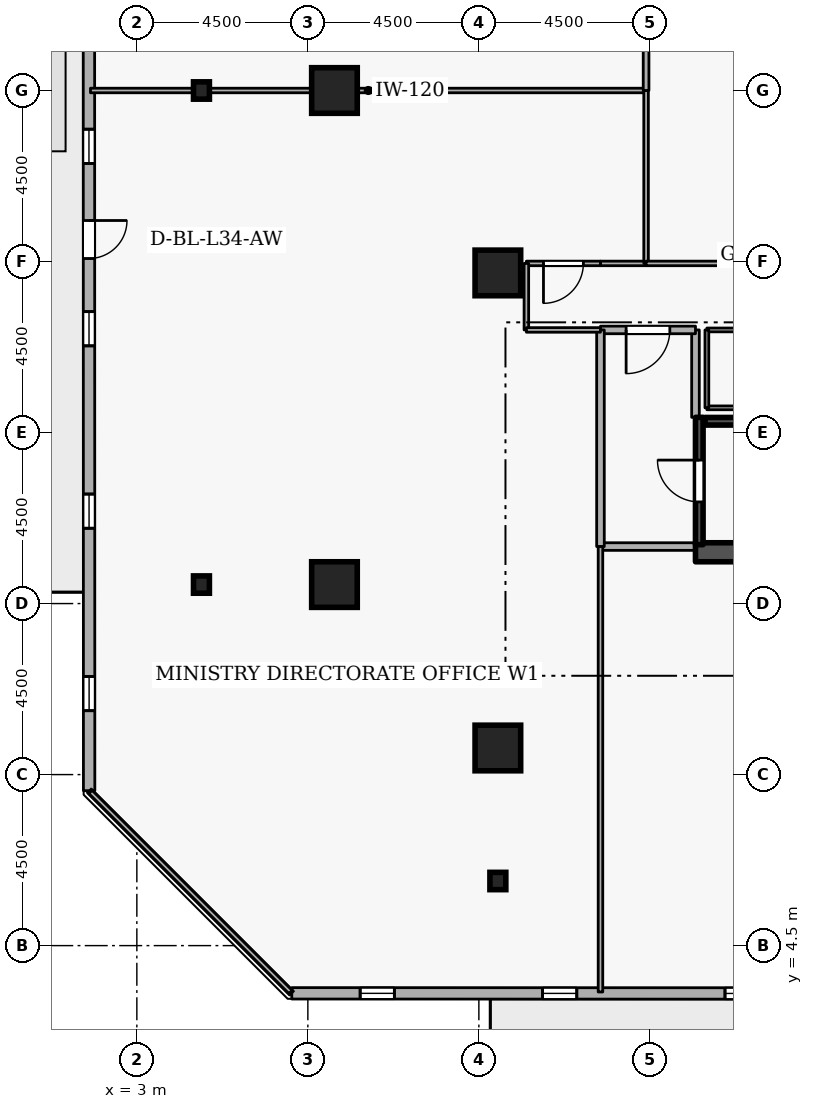
"""IFC4 building model, lengths in metres.
Left out: names, types, materials, properties, quantities, classifications, styles, units other than length and angle.
Written with IfcOpenShell. Run it as: python <this file> out.ifc"""

import sys

from ifc_helpers import new_model, si_unit, direction, frame, frame_2d, origin, origin_2d, place, context, subcontext, project, spatial, rectangle, i_section, extrude, element, fill, save


model = new_model("IFC4")
c1 = context("Model", 3, precision=1e-05, world=origin(), true_north=direction((0.0, 1.0)))
c2 = subcontext(c1, "Body", "Model", "MODEL_VIEW")
j1 = project(units=[si_unit("LENGTHUNIT", "METRE"), si_unit("PLANEANGLEUNIT", "RADIAN")], contexts=[c1])
p1 = place(None, origin())
s1 = spatial("IfcSite", under=j1, at=p1, CompositionType="ELEMENT")
p2 = place(p1, origin())
s2 = spatial("IfcBuilding", under=s1, at=p2, CompositionType="ELEMENT")
p3 = place(p2, frame((0.0, 0.0, 130.5)))
s3 = spatial("IfcBuildingStorey", under=s2, at=p3, CompositionType="ELEMENT", Elevation=130.5)
p4 = place(p3, frame((17.7, 14.85, 0.0), z_axis=(0.0, 0.0, 1.0), x_axis=(1.0, 0.0, 0.0)))
e1 = element("IfcWall", 1, at=p4, inside=s3, PredefinedType="SHEAR", context=c2, shape_type="SweptSolid", body=[
    extrude(rectangle(XDim=15.6, YDim=0.5, at=frame_2d((7.8, 0.0))), origin(), (0.0, 0.0, 1.0), 3.6),
])
for number, where, z_axis, x_axis in (
    (2, (12.5, 9.7, 0.0), (0.0, 0.0, 1.0), (1.0, 0.0, 0.0)),
    (3, (8.2, 14.0, 0.0), (0.0, 0.0, 1.0), (1.0, 0.0, 0.0)),
    (4, (8.2, 27.0, 0.0), (0.0, 0.0, 1.0), (1.0, 0.0, 0.0)),
    (5, (12.5, 22.2, 0.0), (0.0, 0.0, 1.0), (1.0, 0.0, 0.0)),
):
    element("IfcColumn", number, at=place(p3, frame(where, z_axis=z_axis, x_axis=x_axis)), inside=s3, PredefinedType="COLUMN", context=c2, shape_type="SweptSolid", body=[
        extrude(rectangle(XDim=1.2, YDim=1.2, at=origin_2d()), origin(), (0.0, 0.0, 1.0), 3.6),
    ])
for number, where, z_axis, x_axis in (
    (6, (12.5, 6.2, 0.0), (0.0, 0.0, 1.0), (1.0, 0.0, 0.0)),
    (7, (4.7, 14.0, 0.0), (0.0, 0.0, 1.0), (1.0, 0.0, 0.0)),
    (8, (4.7, 27.0, 0.0), (0.0, 0.0, 1.0), (1.0, 0.0, 0.0)),
):
    element("IfcColumn", number, at=place(p3, frame(where, z_axis=z_axis, x_axis=x_axis)), inside=s3, PredefinedType="COLUMN", context=c2, shape_type="SweptSolid", body=[
        extrude(i_section(OverallWidth=0.418, OverallDepth=0.456, WebThickness=0.042, FlangeThickness=0.067, FilletRadius=0.015, at=origin_2d()), origin(), (0.0, 0.0, 1.0), 3.6),
    ])
p5 = place(p3, frame((7.076, 3.244, 0.0), z_axis=(0.0, 0.0, 1.0), x_axis=(0.999999963872, -0.000268805477, 0.0)))
e9 = element("IfcWall", 9, at=p5, inside=s3, PredefinedType="STANDARD", context=c2, shape_type="SweptSolid", body=[
    extrude(rectangle(XDim=33.605, YDim=0.3, at=frame_2d((16.802, 0.0))), origin(), (0.0, 0.0, 1.0), 2.7),
])
p6 = place(p5, frame((26.702, 0.0, 0.0)))
e10 = element("IfcOpeningElement", 10, at=p6, cuts=e9, PredefinedType="OPENING", context=c2, shape_type="SweptSolid", body=[
    extrude(rectangle(XDim=1.0, YDim=2.08, at=frame_2d((0.5, 1.04))), frame((0.0, 0.16, 0.0), z_axis=(0.0, -1.0, 0.0), x_axis=(1.0, 0.0, 0.0)), (0.0, 0.0, 1.0), 0.32),
])
p7 = place(p5, frame((1.8, 0.0, 0.72)))
e11 = element("IfcOpeningElement", 11, at=p7, cuts=e9, PredefinedType="OPENING", context=c2, shape_type="SweptSolid", body=[
    extrude(rectangle(XDim=0.9, YDim=1.75, at=frame_2d((0.45, 0.875))), frame((0.0, 0.16, 0.0), z_axis=(0.0, -1.0, 0.0), x_axis=(1.0, 0.0, 0.0)), (0.0, 0.0, 1.0), 0.32),
])
p8 = place(p5, frame((6.6, 0.0, 0.72)))
e12 = element("IfcOpeningElement", 12, at=p8, cuts=e9, PredefinedType="OPENING", context=c2, shape_type="SweptSolid", body=[
    extrude(rectangle(XDim=0.9, YDim=1.75, at=frame_2d((0.45, 0.875))), frame((0.0, 0.16, 0.0), z_axis=(0.0, -1.0, 0.0), x_axis=(1.0, 0.0, 0.0)), (0.0, 0.0, 1.0), 0.32),
])
p9 = place(p5, frame((11.4, 0.0, 0.72)))
e13 = element("IfcOpeningElement", 13, at=p9, cuts=e9, PredefinedType="OPENING", context=c2, shape_type="SweptSolid", body=[
    extrude(rectangle(XDim=0.9, YDim=1.75, at=frame_2d((0.45, 0.875))), frame((0.0, 0.16, 0.0), z_axis=(0.0, -1.0, 0.0), x_axis=(1.0, 0.0, 0.0)), (0.0, 0.0, 1.0), 0.32),
])
p10 = place(p5, frame((16.2, 0.0, 0.72)))
e14 = element("IfcOpeningElement", 14, at=p10, cuts=e9, PredefinedType="OPENING", context=c2, shape_type="SweptSolid", body=[
    extrude(rectangle(XDim=0.9, YDim=1.75, at=frame_2d((0.45, 0.875))), frame((0.0, 0.16, 0.0), z_axis=(0.0, -1.0, 0.0), x_axis=(1.0, 0.0, 0.0)), (0.0, 0.0, 1.0), 0.32),
])
p11 = place(p5, frame((21.0, 0.0, 0.72)))
e15 = element("IfcOpeningElement", 15, at=p11, cuts=e9, PredefinedType="OPENING", context=c2, shape_type="SweptSolid", body=[
    extrude(rectangle(XDim=0.9, YDim=1.75, at=frame_2d((0.45, 0.875))), frame((0.0, 0.16, 0.0), z_axis=(0.0, -1.0, 0.0), x_axis=(1.0, 0.0, 0.0)), (0.0, 0.0, 1.0), 0.32),
])
p12 = place(p5, frame((30.6, 0.0, 0.72)))
e16 = element("IfcOpeningElement", 16, at=p12, cuts=e9, PredefinedType="OPENING", context=c2, shape_type="SweptSolid", body=[
    extrude(rectangle(XDim=0.9, YDim=1.75, at=frame_2d((0.45, 0.875))), frame((0.0, 0.16, 0.0), z_axis=(0.0, -1.0, 0.0), x_axis=(1.0, 0.0, 0.0)), (0.0, 0.0, 1.0), 0.32),
])
p13 = place(p3, frame((1.735, 42.181, 0.0), z_axis=(0.0, 0.0, 1.0), x_axis=(0.000268805477, -0.999999963872, 0.0)))
e17 = element("IfcWall", 17, at=p13, inside=s3, PredefinedType="STANDARD", context=c2, shape_type="SweptSolid", body=[
    extrude(rectangle(XDim=33.605, YDim=0.3, at=frame_2d((16.802, 0.0))), origin(), (0.0, 0.0, 1.0), 2.7),
])
p14 = place(p13, frame((18.603, 0.0, 0.0)))
e18 = element("IfcOpeningElement", 18, at=p14, cuts=e17, PredefinedType="OPENING", context=c2, shape_type="SweptSolid", body=[
    extrude(rectangle(XDim=1.0, YDim=2.08, at=frame_2d((0.5, 1.04))), frame((0.0, 0.16, 0.0), z_axis=(0.0, -1.0, 0.0), x_axis=(1.0, 0.0, 0.0)), (0.0, 0.0, 1.0), 0.32),
])
p15 = place(p13, frame((1.8, 0.0, 0.72)))
e19 = element("IfcOpeningElement", 19, at=p15, cuts=e17, PredefinedType="OPENING", context=c2, shape_type="SweptSolid", body=[
    extrude(rectangle(XDim=0.9, YDim=1.75, at=frame_2d((0.45, 0.875))), frame((0.0, 0.16, 0.0), z_axis=(0.0, -1.0, 0.0), x_axis=(1.0, 0.0, 0.0)), (0.0, 0.0, 1.0), 0.32),
])
p16 = place(p13, frame((6.6, 0.0, 0.72)))
e20 = element("IfcOpeningElement", 20, at=p16, cuts=e17, PredefinedType="OPENING", context=c2, shape_type="SweptSolid", body=[
    extrude(rectangle(XDim=0.9, YDim=1.75, at=frame_2d((0.45, 0.875))), frame((0.0, 0.16, 0.0), z_axis=(0.0, -1.0, 0.0), x_axis=(1.0, 0.0, 0.0)), (0.0, 0.0, 1.0), 0.32),
])
p17 = place(p13, frame((11.4, 0.0, 0.72)))
e21 = element("IfcOpeningElement", 21, at=p17, cuts=e17, PredefinedType="OPENING", context=c2, shape_type="SweptSolid", body=[
    extrude(rectangle(XDim=0.9, YDim=1.75, at=frame_2d((0.45, 0.875))), frame((0.0, 0.16, 0.0), z_axis=(0.0, -1.0, 0.0), x_axis=(1.0, 0.0, 0.0)), (0.0, 0.0, 1.0), 0.32),
])
p18 = place(p13, frame((16.2, 0.0, 0.72)))
e22 = element("IfcOpeningElement", 22, at=p18, cuts=e17, PredefinedType="OPENING", context=c2, shape_type="SweptSolid", body=[
    extrude(rectangle(XDim=0.9, YDim=1.75, at=frame_2d((0.45, 0.875))), frame((0.0, 0.16, 0.0), z_axis=(0.0, -1.0, 0.0), x_axis=(1.0, 0.0, 0.0)), (0.0, 0.0, 1.0), 0.32),
])
p19 = place(p13, frame((21.0, 0.0, 0.72)))
e23 = element("IfcOpeningElement", 23, at=p19, cuts=e17, PredefinedType="OPENING", context=c2, shape_type="SweptSolid", body=[
    extrude(rectangle(XDim=0.9, YDim=1.75, at=frame_2d((0.45, 0.875))), frame((0.0, 0.16, 0.0), z_axis=(0.0, -1.0, 0.0), x_axis=(1.0, 0.0, 0.0)), (0.0, 0.0, 1.0), 0.32),
])
p20 = place(p13, frame((25.8, 0.0, 0.72)))
e24 = element("IfcOpeningElement", 24, at=p20, cuts=e17, PredefinedType="OPENING", context=c2, shape_type="SweptSolid", body=[
    extrude(rectangle(XDim=0.9, YDim=1.75, at=frame_2d((0.45, 0.875))), frame((0.0, 0.16, 0.0), z_axis=(0.0, -1.0, 0.0), x_axis=(1.0, 0.0, 0.0)), (0.0, 0.0, 1.0), 0.32),
])
p21 = place(p13, frame((30.6, 0.0, 0.72)))
e25 = element("IfcOpeningElement", 25, at=p21, cuts=e17, PredefinedType="OPENING", context=c2, shape_type="SweptSolid", body=[
    extrude(rectangle(XDim=0.9, YDim=1.75, at=frame_2d((0.45, 0.875))), frame((0.0, 0.16, 0.0), z_axis=(0.0, -1.0, 0.0), x_axis=(1.0, 0.0, 0.0)), (0.0, 0.0, 1.0), 0.32),
])
p22 = place(p3, frame((17.8, 15.05, 0.0), z_axis=(0.0, 0.0, 1.0), x_axis=(0.0, 1.0, 0.0)))
e26 = element("IfcWall", 26, at=p22, inside=s3, PredefinedType="SHEAR", context=c2, shape_type="SweptSolid", body=[
    extrude(rectangle(XDim=3.35, YDim=0.2, at=frame_2d((1.675, 0.0))), origin(), (0.0, 0.0, 1.0), 3.6),
])
p23 = place(p22, frame((1.125, 0.0, 0.0)))
e27 = element("IfcOpeningElement", 27, at=p23, cuts=e26, PredefinedType="OPENING", context=c2, shape_type="SweptSolid", body=[
    extrude(rectangle(XDim=1.1, YDim=2.1, at=frame_2d((0.55, 1.05))), frame((0.0, 0.11, 0.0), z_axis=(0.0, -1.0, 0.0), x_axis=(1.0, 0.0, 0.0)), (0.0, 0.0, 1.0), 0.22),
])
p24 = place(p3, frame((25.05, 18.297, 0.0), z_axis=(0.0, 0.0, 1.0), x_axis=(-1.0, 0.0, 0.0)))
e28 = element("IfcWall", 28, at=p24, inside=s3, PredefinedType="SHEAR", context=c2, shape_type="SweptSolid", body=[
    extrude(rectangle(XDim=7.1, YDim=0.2, at=frame_2d((3.55, 0.0))), origin(), (0.0, 0.0, 1.0), 3.6),
])
p25 = place(p3, frame((15.2, 15.0, 0.0), z_axis=(0.0, 0.0, 1.0), x_axis=(1.0, 0.0, 0.0)))
e29 = element("IfcWall", 29, at=p25, inside=s3, PredefinedType="STANDARD", context=c2, shape_type="SweptSolid", body=[
    extrude(rectangle(XDim=2.5, YDim=0.2, at=frame_2d((1.25, 0.0))), origin(), (0.0, 0.0, 1.0), 3.34),
])
p26 = place(p3, frame((17.7, 18.4, 0.0), z_axis=(0.0, 0.0, 1.0), x_axis=(0.0, 1.0, 0.0)))
e30 = element("IfcWall", 30, at=p26, inside=s3, PredefinedType="STANDARD", context=c2, shape_type="SweptSolid", body=[
    extrude(rectangle(XDim=2.3, YDim=0.2, at=frame_2d((1.15, 0.0))), origin(), (0.0, 0.0, 1.0), 2.545),
])
p27 = place(p3, frame((17.7, 20.7, 0.0), z_axis=(0.0, 0.0, 1.0), x_axis=(-1.0, 0.0, 0.0)))
e31 = element("IfcWall", 31, at=p27, inside=s3, PredefinedType="STANDARD", context=c2, shape_type="SweptSolid", body=[
    extrude(rectangle(XDim=2.5, YDim=0.2, at=frame_2d((1.25, 0.0))), origin(), (0.0, 0.0, 1.0), 3.34),
])
p28 = place(p27, frame((0.675, 0.0, 0.0)))
e32 = element("IfcOpeningElement", 32, at=p28, cuts=e31, PredefinedType="OPENING", context=c2, shape_type="SweptSolid", body=[
    extrude(rectangle(XDim=1.15, YDim=2.1, at=frame_2d((0.575, 1.05))), frame((0.0, 0.11, 0.0), z_axis=(0.0, -1.0, 0.0), x_axis=(1.0, 0.0, 0.0)), (0.0, 0.0, 1.0), 0.22),
])
p29 = place(p3, frame((15.2, 20.7, 0.0), z_axis=(0.0, 0.0, 1.0), x_axis=(0.0, -1.0, 0.0)))
e33 = element("IfcWall", 33, at=p29, inside=s3, PredefinedType="STANDARD", context=c2, shape_type="SweptSolid", body=[
    extrude(rectangle(XDim=5.7, YDim=0.2, at=frame_2d((2.85, 0.0))), origin(), (0.0, 0.0, 1.0), 3.34),
])
p30 = place(p3, frame((18.0, 18.65, 0.0), z_axis=(0.0, 0.0, 1.0), x_axis=(1.0, 0.0, 0.0)))
e34 = element("IfcWall", 34, at=p30, inside=s3, PredefinedType="PARTITIONING", context=c2, shape_type="SweptSolid", body=[
    extrude(rectangle(XDim=2.6, YDim=0.1, at=frame_2d((1.3, 0.0))), origin(), (0.0, 0.0, 1.0), 3.34),
])
p31 = place(p3, frame((20.6, 20.7, 0.0), z_axis=(0.0, 0.0, 1.0), x_axis=(-1.0, 0.0, 0.0)))
e35 = element("IfcWall", 35, at=p31, inside=s3, PredefinedType="PARTITIONING", context=c2, shape_type="SweptSolid", body=[
    extrude(rectangle(XDim=2.6, YDim=0.1, at=frame_2d((1.3, 0.0))), origin(), (0.0, 0.0, 1.0), 3.34),
])
p32 = place(p31, frame((0.825, 0.0, 0.0)))
e36 = element("IfcOpeningElement", 36, at=p32, cuts=e35, PredefinedType="OPENING", context=c2, shape_type="SweptSolid", body=[
    extrude(rectangle(XDim=0.95, YDim=2.1, at=frame_2d((0.475, 1.05))), frame((0.0, 0.06, 0.0), z_axis=(0.0, -1.0, 0.0), x_axis=(1.0, 0.0, 0.0)), (0.0, 0.0, 1.0), 0.12),
])
p33 = place(p3, frame((18.0, 20.7, 0.0), z_axis=(0.0, 0.0, 1.0), x_axis=(0.0, -1.0, 0.0)))
e37 = element("IfcWall", 37, at=p33, inside=s3, PredefinedType="PARTITIONING", context=c2, shape_type="SweptSolid", body=[
    extrude(rectangle(XDim=2.05, YDim=0.1, at=frame_2d((1.025, 0.0))), origin(), (0.0, 0.0, 1.0), 2.545),
])
p34 = place(p3, frame((16.4, 22.45, 0.0), z_axis=(0.0, 0.0, 1.0), x_axis=(-1.0, 0.0, 0.0)))
e38 = element("IfcWall", 38, at=p34, inside=s3, PredefinedType="PARTITIONING", context=c2, shape_type="SweptSolid", body=[
    extrude(rectangle(XDim=1.2, YDim=0.12, at=frame_2d((0.6, 0.0))), origin(), (0.0, 0.0, 1.0), 3.34),
])
p35 = place(p3, frame((15.2, 22.45, 0.0), z_axis=(0.0, 0.0, 1.0), x_axis=(-1.0, 0.0, 0.0)))
e39 = element("IfcWall", 39, at=p35, inside=s3, PredefinedType="PARTITIONING", context=c2, shape_type="SweptSolid", body=[
    extrude(rectangle(XDim=1.95, YDim=0.12, at=frame_2d((0.975, 0.0))), origin(), (0.0, 0.0, 1.0), 3.34),
])
p36 = place(p35, frame((0.45, 0.0, 0.0)))
e40 = element("IfcOpeningElement", 40, at=p36, cuts=e39, PredefinedType="OPENING", context=c2, shape_type="SweptSolid", body=[
    extrude(rectangle(XDim=1.05, YDim=2.1, at=frame_2d((0.525, 1.05))), frame((0.0, 0.07, 0.0), z_axis=(0.0, -1.0, 0.0), x_axis=(1.0, 0.0, 0.0)), (0.0, 0.0, 1.0), 0.14),
])
p37 = place(p3, frame((13.25, 22.45, 0.0), z_axis=(0.0, 0.0, 1.0), x_axis=(0.0, -1.0, 0.0)))
e41 = element("IfcWall", 41, at=p37, inside=s3, PredefinedType="PARTITIONING", context=c2, shape_type="SweptSolid", body=[
    extrude(rectangle(XDim=1.75, YDim=0.12, at=frame_2d((0.875, 0.0))), origin(), (0.0, 0.0, 1.0), 3.34),
])
p38 = place(p3, frame((13.25, 20.7, 0.0), z_axis=(0.0, 0.0, 1.0), x_axis=(1.0, 0.0, 0.0)))
e42 = element("IfcWall", 42, at=p38, inside=s3, PredefinedType="PARTITIONING", context=c2, shape_type="SweptSolid", body=[
    extrude(rectangle(XDim=1.95, YDim=0.12, at=frame_2d((0.975, 0.0))), origin(), (0.0, 0.0, 1.0), 3.34),
])
p39 = place(p3, frame((15.2, 15.0, 0.0), z_axis=(0.0, 0.0, 1.0), x_axis=(0.0, -1.0, 0.0)))
e43 = element("IfcWall", 43, at=p39, inside=s3, PredefinedType="PARTITIONING", context=c2, shape_type="SweptSolid", body=[
    extrude(rectangle(XDim=11.72, YDim=0.12, at=frame_2d((5.86, 0.0))), origin(), (0.0, 0.0, 1.0), 3.34),
])
p40 = place(p3, frame((7.044, 3.28, 0.0), z_axis=(0.0, 0.0, 1.0), x_axis=(-0.707106781187, 0.707106781187, 0.0)))
e44 = element("IfcWall", 44, at=p40, inside=s3, PredefinedType="PARTITIONING", context=c2, shape_type="SweptSolid", body=[
    extrude(rectangle(XDim=7.444, YDim=0.12, at=frame_2d((3.722, 0.0))), origin(), (0.0, 0.0, 1.0), 3.34),
])
p41 = place(p3, frame((1.78, 27.0, 0.0), z_axis=(0.0, 0.0, 1.0), x_axis=(1.0, 0.0, 0.0)))
e45 = element("IfcWall", 45, at=p41, inside=s3, PredefinedType="PARTITIONING", context=c2, shape_type="SweptSolid", body=[
    extrude(rectangle(XDim=14.62, YDim=0.12, at=frame_2d((7.31, 0.0))), origin(), (0.0, 0.0, 1.0), 2.878),
])
p42 = place(p3, frame((16.4, 27.0, 0.0), z_axis=(0.0, 0.0, 1.0), x_axis=(0.0, -1.0, 0.0)))
e46 = element("IfcWall", 46, at=p42, inside=s3, PredefinedType="PARTITIONING", context=c2, shape_type="SweptSolid", body=[
    extrude(rectangle(XDim=4.55, YDim=0.12, at=frame_2d((2.275, 0.0))), origin(), (0.0, 0.0, 1.0), 3.34),
])
p43 = place(p3, frame((16.4, 31.55, 0.0), z_axis=(0.0, 0.0, 1.0), x_axis=(0.0, -1.0, 0.0)))
e47 = element("IfcWall", 47, at=p43, inside=s3, PredefinedType="PARTITIONING", context=c2, shape_type="SweptSolid", body=[
    extrude(rectangle(XDim=4.55, YDim=0.15, at=frame_2d((2.275, 0.0))), origin(), (0.0, 0.0, 1.0), 3.34),
])
p44 = place(p3, frame((20.9, 22.45, 0.0), z_axis=(0.0, 0.0, 1.0), x_axis=(-1.0, 0.0, 0.0)))
e48 = element("IfcWall", 48, at=p44, inside=s3, PredefinedType="PARTITIONING", context=c2, shape_type="SweptSolid", body=[
    extrude(rectangle(XDim=4.5, YDim=0.12, at=frame_2d((2.25, 0.0))), origin(), (0.0, 0.0, 1.0), 3.34),
])
p45 = place(p7, origin())
e49 = element("IfcWindow", 49, at=p45, inside=s3, PartitioningType="SINGLE_PANEL", PredefinedType="WINDOW", context=c2, shape_type="SweptSolid", body=[
    extrude(rectangle(XDim=0.9, YDim=1.75, at=frame_2d((0.45, 0.875))), frame((0.0, 0.03, 0.0), z_axis=(0.0, -1.0, 0.0), x_axis=(1.0, 0.0, 0.0)), (0.0, 0.0, 1.0), 0.06),
])
fill(e11, e49)
p46 = place(p8, origin())
e50 = element("IfcWindow", 50, at=p46, inside=s3, PartitioningType="SINGLE_PANEL", PredefinedType="WINDOW", context=c2, shape_type="SweptSolid", body=[
    extrude(rectangle(XDim=0.9, YDim=1.75, at=frame_2d((0.45, 0.875))), frame((0.0, 0.03, 0.0), z_axis=(0.0, -1.0, 0.0), x_axis=(1.0, 0.0, 0.0)), (0.0, 0.0, 1.0), 0.06),
])
fill(e12, e50)
p47 = place(p9, origin())
e51 = element("IfcWindow", 51, at=p47, inside=s3, PartitioningType="SINGLE_PANEL", PredefinedType="WINDOW", context=c2, shape_type="SweptSolid", body=[
    extrude(rectangle(XDim=0.9, YDim=1.75, at=frame_2d((0.45, 0.875))), frame((0.0, 0.03, 0.0), z_axis=(0.0, -1.0, 0.0), x_axis=(1.0, 0.0, 0.0)), (0.0, 0.0, 1.0), 0.06),
])
fill(e13, e51)
p48 = place(p14, origin())
e52 = element("IfcDoor", 52, at=p48, inside=s3, OperationType="SINGLE_SWING_LEFT", PredefinedType="DOOR", context=c2, shape_type="SweptSolid", body=[
    extrude(rectangle(XDim=1.0, YDim=2.08, at=frame_2d((0.5, 1.04))), frame((0.0, 0.025, 0.0), z_axis=(0.0, -1.0, 0.0), x_axis=(1.0, 0.0, 0.0)), (0.0, 0.0, 1.0), 0.05),
])
fill(e18, e52)
p49 = place(p18, origin())
e53 = element("IfcWindow", 53, at=p49, inside=s3, PartitioningType="SINGLE_PANEL", PredefinedType="WINDOW", context=c2, shape_type="SweptSolid", body=[
    extrude(rectangle(XDim=0.9, YDim=1.75, at=frame_2d((0.45, 0.875))), frame((0.0, 0.03, 0.0), z_axis=(0.0, -1.0, 0.0), x_axis=(1.0, 0.0, 0.0)), (0.0, 0.0, 1.0), 0.06),
])
fill(e22, e53)
p50 = place(p19, origin())
e54 = element("IfcWindow", 54, at=p50, inside=s3, PartitioningType="SINGLE_PANEL", PredefinedType="WINDOW", context=c2, shape_type="SweptSolid", body=[
    extrude(rectangle(XDim=0.9, YDim=1.75, at=frame_2d((0.45, 0.875))), frame((0.0, 0.03, 0.0), z_axis=(0.0, -1.0, 0.0), x_axis=(1.0, 0.0, 0.0)), (0.0, 0.0, 1.0), 0.06),
])
fill(e23, e54)
p51 = place(p20, origin())
e55 = element("IfcWindow", 55, at=p51, inside=s3, PartitioningType="SINGLE_PANEL", PredefinedType="WINDOW", context=c2, shape_type="SweptSolid", body=[
    extrude(rectangle(XDim=0.9, YDim=1.75, at=frame_2d((0.45, 0.875))), frame((0.0, 0.03, 0.0), z_axis=(0.0, -1.0, 0.0), x_axis=(1.0, 0.0, 0.0)), (0.0, 0.0, 1.0), 0.06),
])
fill(e24, e55)
p52 = place(p21, origin())
e56 = element("IfcWindow", 56, at=p52, inside=s3, PartitioningType="SINGLE_PANEL", PredefinedType="WINDOW", context=c2, shape_type="SweptSolid", body=[
    extrude(rectangle(XDim=0.9, YDim=1.75, at=frame_2d((0.45, 0.875))), frame((0.0, 0.03, 0.0), z_axis=(0.0, -1.0, 0.0), x_axis=(1.0, 0.0, 0.0)), (0.0, 0.0, 1.0), 0.06),
])
fill(e25, e56)
p53 = place(p23, origin())
e57 = element("IfcDoor", 57, at=p53, inside=s3, OperationType="SINGLE_SWING_RIGHT", PredefinedType="DOOR", context=c2, shape_type="SweptSolid", body=[
    extrude(rectangle(XDim=1.1, YDim=2.1, at=frame_2d((0.55, 1.05))), frame((0.0, 0.025, 0.0), z_axis=(0.0, -1.0, 0.0), x_axis=(1.0, 0.0, 0.0)), (0.0, 0.0, 1.0), 0.05),
])
fill(e27, e57)
p54 = place(p28, origin())
e58 = element("IfcDoor", 58, at=p54, inside=s3, OperationType="SINGLE_SWING_RIGHT", PredefinedType="DOOR", context=c2, shape_type="SweptSolid", body=[
    extrude(rectangle(XDim=1.15, YDim=2.1, at=frame_2d((0.575, 1.05))), frame((0.0, 0.025, 0.0), z_axis=(0.0, -1.0, 0.0), x_axis=(1.0, 0.0, 0.0)), (0.0, 0.0, 1.0), 0.05),
])
fill(e32, e58)
p55 = place(p36, origin())
e59 = element("IfcDoor", 59, at=p55, inside=s3, OperationType="SINGLE_SWING_RIGHT", PredefinedType="DOOR", context=c2, shape_type="SweptSolid", body=[
    extrude(rectangle(XDim=1.05, YDim=2.1, at=frame_2d((0.525, 1.05))), frame((0.0, 0.025, 0.0), z_axis=(0.0, -1.0, 0.0), x_axis=(1.0, 0.0, 0.0)), (0.0, 0.0, 1.0), 0.05),
])
fill(e40, e59)
save(model, sys.argv[1])
